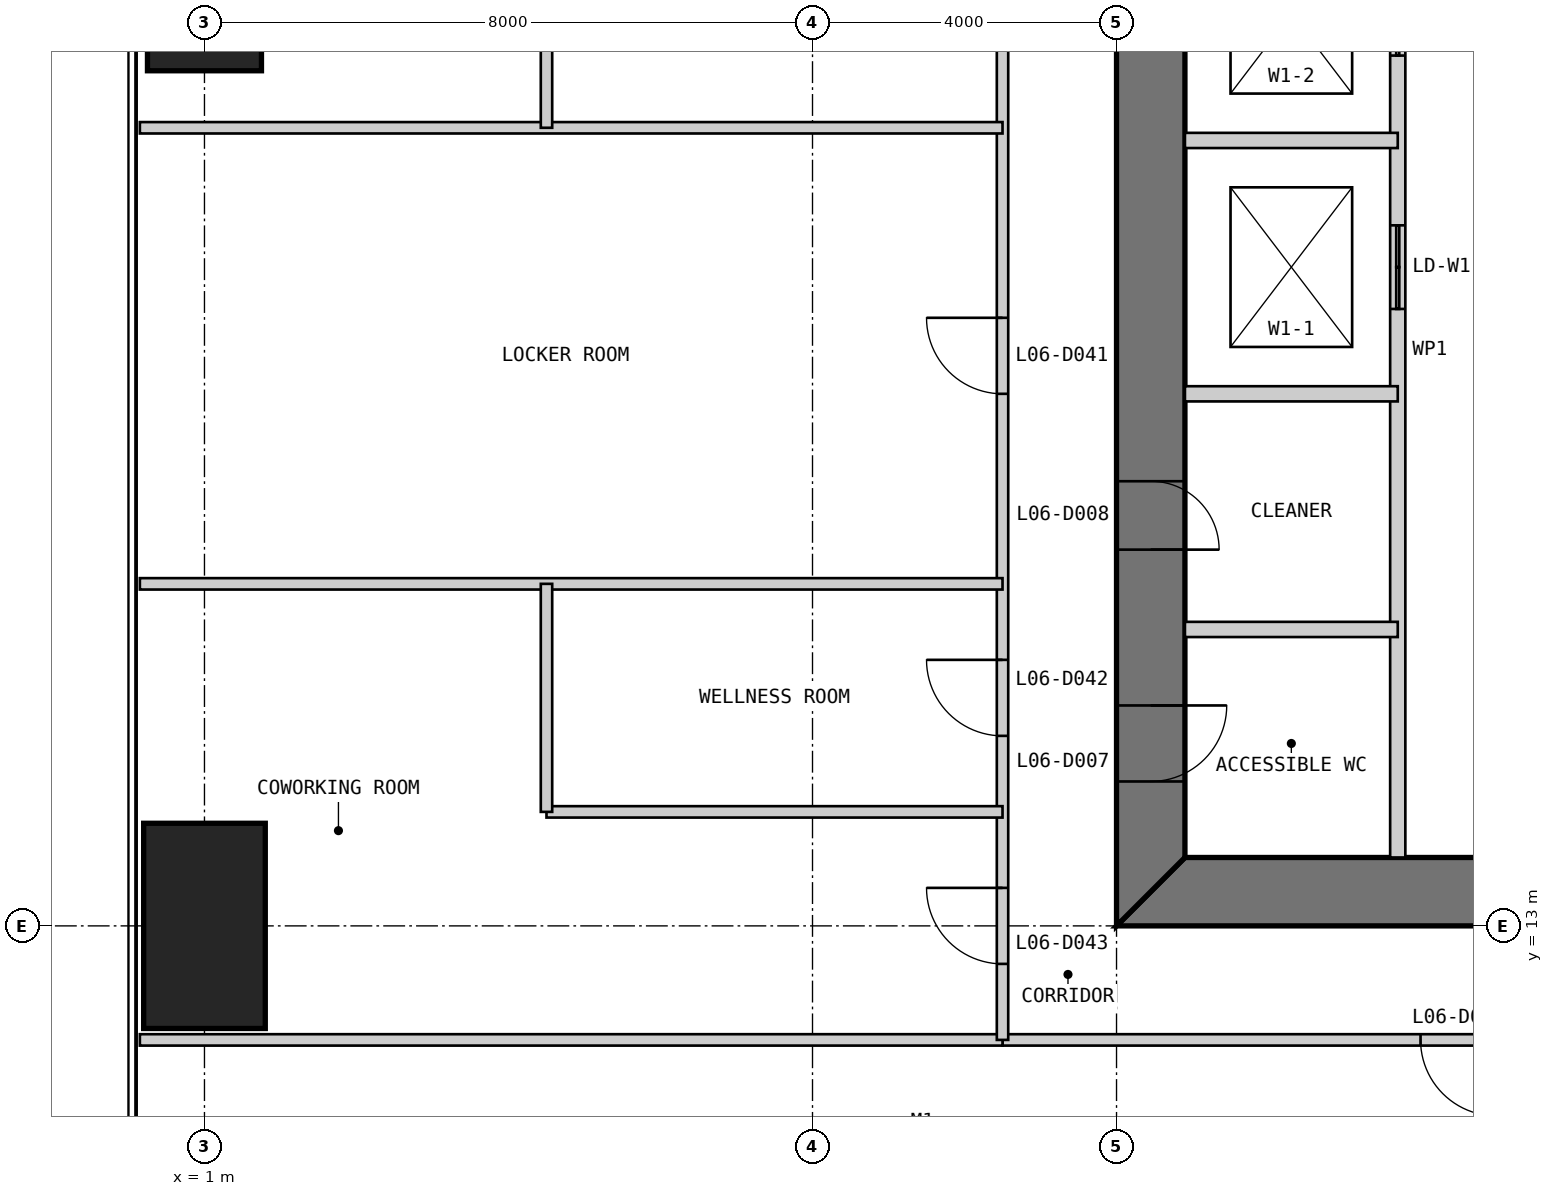
"""IFC4 building model, lengths in metres.
Left out: names, types, materials, properties, quantities, classifications, styles, units other than length and angle.
Written with IfcOpenShell. Run it as: python <this file> out.ifc"""

import sys

from ifc_helpers import new_model, si_unit, direction, frame, frame_2d, origin, origin_2d, place, context, subcontext, project, spatial, polyline, rectangle, outline, extrude, element, fill, save


model = new_model("IFC4")
c1 = context("Model", 3, precision=1e-05, world=origin(), true_north=direction((0.0, 1.0)))
c2 = subcontext(c1, "Body", "Model", "MODEL_VIEW")
j1 = project(units=[si_unit("LENGTHUNIT", "METRE"), si_unit("PLANEANGLEUNIT", "RADIAN")], contexts=[c1])
p1 = place(None, origin())
s1 = spatial("IfcSite", under=j1, at=p1, CompositionType="ELEMENT")
p2 = place(p1, origin())
s2 = spatial("IfcBuilding", under=s1, at=p2, CompositionType="ELEMENT")
p3 = place(p2, frame((0.0, 0.0, 31.0)))
s3 = spatial("IfcBuildingStorey", under=s2, at=p3, CompositionType="ELEMENT", Elevation=31.0)
p4 = place(p3, frame((1.0, 25.0, 0.0), z_axis=(0.0, 0.0, 1.0), x_axis=(1.0, 0.0, 0.0)))
e1 = element("IfcColumn", 1, at=p4, inside=s3, PredefinedType="COLUMN", context=c2, shape_type="SweptSolid", body=[
    extrude(rectangle(XDim=1.5, YDim=1.5, at=origin_2d()), origin(), (0.0, 0.0, 1.0), 4.0),
])
p5 = place(p3, frame((1.0, 13.0, 0.0), z_axis=(0.0, 0.0, 1.0), x_axis=(1.0, 0.0, 0.0)))
e2 = element("IfcColumn", 2, at=p5, inside=s3, PredefinedType="COLUMN", context=c2, shape_type="SweptSolid", body=[
    extrude(rectangle(XDim=1.6, YDim=2.7, at=origin_2d()), origin(), (0.0, 0.0, 1.0), 4.0),
])
p6 = place(p3, frame((13.0, 13.45, 0.0), z_axis=(0.0, 0.0, 1.0), x_axis=(1.0, 0.0, 0.0)))
e3 = element("IfcWall", 3, at=p6, inside=s3, PredefinedType="SHEAR", context=c2, shape_type="SweptSolid", body=[
    extrude(outline(polyline([(0.0, -0.45), (24.0, -0.45), (23.1, 0.45), (0.9, 0.45), (0.0, -0.45)])), origin(), (0.0, 0.0, 1.0), 4.0),
])
p7 = place(p6, frame((4.9, 0.0, 0.0)))
e4 = element("IfcOpeningElement", 4, at=p7, cuts=e3, PredefinedType="OPENING", context=c2, shape_type="SweptSolid", body=[
    extrude(rectangle(XDim=1.0, YDim=2.2, at=frame_2d((0.5, 1.1))), frame((0.0, 0.46, 0.0), z_axis=(0.0, -1.0, 0.0), x_axis=(1.0, 0.0, 0.0)), (0.0, 0.0, 1.0), 0.92),
])
p8 = place(p6, frame((8.9, 0.0, 0.0)))
e5 = element("IfcOpeningElement", 5, at=p8, cuts=e3, PredefinedType="OPENING", context=c2, shape_type="SweptSolid", body=[
    extrude(rectangle(XDim=1.1, YDim=2.2, at=frame_2d((0.55, 1.1))), frame((0.0, 0.46, 0.0), z_axis=(0.0, -1.0, 0.0), x_axis=(1.0, 0.0, 0.0)), (0.0, 0.0, 1.0), 0.92),
])
p9 = place(p6, frame((15.05, 0.0, 0.0)))
e6 = element("IfcOpeningElement", 6, at=p9, cuts=e3, PredefinedType="OPENING", context=c2, shape_type="SweptSolid", body=[
    extrude(rectangle(XDim=0.9, YDim=2.2, at=frame_2d((0.45, 1.1))), frame((0.0, 0.46, 0.0), z_axis=(0.0, -1.0, 0.0), x_axis=(1.0, 0.0, 0.0)), (0.0, 0.0, 1.0), 0.92),
])
p10 = place(p6, frame((17.9, 0.0, 0.0)))
e7 = element("IfcOpeningElement", 7, at=p10, cuts=e3, PredefinedType="OPENING", context=c2, shape_type="SweptSolid", body=[
    extrude(rectangle(XDim=1.0, YDim=2.2, at=frame_2d((0.5, 1.1))), frame((0.0, 0.46, 0.0), z_axis=(0.0, -1.0, 0.0), x_axis=(1.0, 0.0, 0.0)), (0.0, 0.0, 1.0), 0.92),
])
p11 = place(p6, frame((21.4, 0.0, 0.0)))
e8 = element("IfcOpeningElement", 8, at=p11, cuts=e3, PredefinedType="OPENING", context=c2, shape_type="SweptSolid", body=[
    extrude(rectangle(XDim=1.0, YDim=2.2, at=frame_2d((0.5, 1.1))), frame((0.0, 0.46, 0.0), z_axis=(0.0, -1.0, 0.0), x_axis=(1.0, 0.0, 0.0)), (0.0, 0.0, 1.0), 0.92),
])
p12 = place(p3, frame((13.45, 36.1, 0.0), z_axis=(0.0, 0.0, 1.0), x_axis=(0.0, -1.0, 0.0)))
e9 = element("IfcWall", 9, at=p12, inside=s3, PredefinedType="SHEAR", context=c2, shape_type="SweptSolid", body=[
    extrude(outline(polyline([(-0.9, -0.45), (23.1, -0.45), (22.2, 0.45), (0.0, 0.45), (-0.9, -0.45)])), origin(), (0.0, 0.0, 1.0), 4.0),
])
p13 = place(p12, frame((20.2, 0.0, 0.0)))
e10 = element("IfcOpeningElement", 10, at=p13, cuts=e9, PredefinedType="OPENING", context=c2, shape_type="SweptSolid", body=[
    extrude(rectangle(XDim=1.0, YDim=2.2, at=frame_2d((0.5, 1.1))), frame((0.0, 0.46, 0.0), z_axis=(0.0, -1.0, 0.0), x_axis=(1.0, 0.0, 0.0)), (0.0, 0.0, 1.0), 0.92),
])
p14 = place(p12, frame((17.25, 0.0, 0.0)))
e11 = element("IfcOpeningElement", 11, at=p14, cuts=e9, PredefinedType="OPENING", context=c2, shape_type="SweptSolid", body=[
    extrude(rectangle(XDim=0.9, YDim=2.2, at=frame_2d((0.45, 1.1))), frame((0.0, 0.46, 0.0), z_axis=(0.0, -1.0, 0.0), x_axis=(1.0, 0.0, 0.0)), (0.0, 0.0, 1.0), 0.92),
])
p15 = place(p3, frame((16.7, 13.9, 0.0), z_axis=(0.0, 0.0, 1.0), x_axis=(0.0, 1.0, 0.0)))
e12 = element("IfcWall", 12, at=p15, inside=s3, PredefinedType="PARTITIONING", context=c2, shape_type="SweptSolid", body=[
    extrude(rectangle(XDim=16.1, YDim=0.2, at=frame_2d((8.05, 0.0))), origin(), (0.0, 0.0, 1.0), 3.8),
])
p16 = place(p15, frame((7.217, 0.0, 0.0)))
e13 = element("IfcOpeningElement", 13, at=p16, cuts=e12, PredefinedType="OPENING", context=c2, shape_type="SweptSolid", body=[
    extrude(rectangle(XDim=1.1, YDim=2.2, at=frame_2d((0.55, 1.1))), frame((0.0, 0.11, 0.0), z_axis=(0.0, -1.0, 0.0), x_axis=(1.0, 0.0, 0.0)), (0.0, 0.0, 1.0), 0.22),
])
p17 = place(p15, frame((10.55, 0.0, 0.0)))
e14 = element("IfcOpeningElement", 14, at=p17, cuts=e12, PredefinedType="OPENING", context=c2, shape_type="SweptSolid", body=[
    extrude(rectangle(XDim=1.1, YDim=2.2, at=frame_2d((0.55, 1.1))), frame((0.0, 0.11, 0.0), z_axis=(0.0, -1.0, 0.0), x_axis=(1.0, 0.0, 0.0)), (0.0, 0.0, 1.0), 0.22),
])
p18 = place(p15, frame((13.883, 0.0, 0.0)))
e15 = element("IfcOpeningElement", 15, at=p18, cuts=e12, PredefinedType="OPENING", context=c2, shape_type="SweptSolid", body=[
    extrude(rectangle(XDim=1.1, YDim=2.2, at=frame_2d((0.55, 1.1))), frame((0.0, 0.11, 0.0), z_axis=(0.0, -1.0, 0.0), x_axis=(1.0, 0.0, 0.0)), (0.0, 0.0, 1.0), 0.22),
])
for number, where, z_axis, x_axis in (
    (16, (13.9, 16.9, 0.0), (0.0, 0.0, 1.0), (1.0, 0.0, 0.0)),
    (17, (13.9, 20.0, 0.0), (0.0, 0.0, 1.0), (1.0, 0.0, 0.0)),
    (18, (13.9, 23.333, 0.0), (0.0, 0.0, 1.0), (1.0, 0.0, 0.0)),
):
    element("IfcWall", number, at=place(p3, frame(where, z_axis=z_axis, x_axis=x_axis)), inside=s3, PredefinedType="PARTITIONING", context=c2, shape_type="SweptSolid", body=[
        extrude(rectangle(XDim=2.8, YDim=0.2, at=frame_2d((1.4, 0.0))), origin(), (0.0, 0.0, 1.0), 3.8),
    ])
p19 = place(p3, frame((11.5, 11.5, 0.0), z_axis=(0.0, 0.0, 1.0), x_axis=(1.0, 0.0, 0.0)))
e19 = element("IfcWall", 19, at=p19, inside=s3, PredefinedType="PARTITIONING", context=c2, shape_type="SweptSolid", body=[
    extrude(rectangle(XDim=27.0, YDim=0.15, at=frame_2d((13.5, 0.0))), origin(), (0.0, 0.0, 1.0), 3.85),
])
p20 = place(p19, frame((5.5, 0.0, 0.0)))
e20 = element("IfcOpeningElement", 20, at=p20, cuts=e19, PredefinedType="OPENING", context=c2, shape_type="SweptSolid", body=[
    extrude(rectangle(XDim=1.0, YDim=2.2, at=frame_2d((0.5, 1.1))), frame((0.0, 0.085, 0.0), z_axis=(0.0, -1.0, 0.0), x_axis=(1.0, 0.0, 0.0)), (0.0, 0.0, 1.0), 0.17),
])
p21 = place(p19, frame((17.5, 0.0, 0.0)))
e21 = element("IfcOpeningElement", 21, at=p21, cuts=e19, PredefinedType="OPENING", context=c2, shape_type="SweptSolid", body=[
    extrude(rectangle(XDim=1.0, YDim=2.2, at=frame_2d((0.5, 1.1))), frame((0.0, 0.085, 0.0), z_axis=(0.0, -1.0, 0.0), x_axis=(1.0, 0.0, 0.0)), (0.0, 0.0, 1.0), 0.17),
])
p22 = place(p19, frame((23.5, 0.0, 0.0)))
e22 = element("IfcOpeningElement", 22, at=p22, cuts=e19, PredefinedType="OPENING", context=c2, shape_type="SweptSolid", body=[
    extrude(rectangle(XDim=1.0, YDim=2.2, at=frame_2d((0.5, 1.1))), frame((0.0, 0.085, 0.0), z_axis=(0.0, -1.0, 0.0), x_axis=(1.0, 0.0, 0.0)), (0.0, 0.0, 1.0), 0.17),
])
p23 = place(p3, frame((0.15, 11.5, 0.0), z_axis=(0.0, 0.0, 1.0), x_axis=(1.0, 0.0, 0.0)))
e23 = element("IfcWall", 23, at=p23, inside=s3, PredefinedType="PARTITIONING", context=c2, shape_type="SweptSolid", body=[
    extrude(rectangle(XDim=11.35, YDim=0.15, at=frame_2d((5.675, 0.0))), origin(), (0.0, 0.0, 1.0), 3.85),
])
p24 = place(p3, frame((11.5, 38.5, 0.0), z_axis=(0.0, 0.0, 1.0), x_axis=(0.0, -1.0, 0.0)))
e24 = element("IfcWall", 24, at=p24, inside=s3, PredefinedType="PARTITIONING", context=c2, shape_type="SweptSolid", body=[
    extrude(rectangle(XDim=27.0, YDim=0.15, at=frame_2d((13.5, 0.0))), origin(), (0.0, 0.0, 1.0), 3.85),
])
p25 = place(p24, frame((2.5, 0.0, 0.0)))
e25 = element("IfcOpeningElement", 25, at=p25, cuts=e24, PredefinedType="OPENING", context=c2, shape_type="SweptSolid", body=[
    extrude(rectangle(XDim=1.0, YDim=2.2, at=frame_2d((0.5, 1.1))), frame((0.0, 0.085, 0.0), z_axis=(0.0, -1.0, 0.0), x_axis=(1.0, 0.0, 0.0)), (0.0, 0.0, 1.0), 0.17),
])
p26 = place(p24, frame((11.5, 0.0, 0.0)))
e26 = element("IfcOpeningElement", 26, at=p26, cuts=e24, PredefinedType="OPENING", context=c2, shape_type="SweptSolid", body=[
    extrude(rectangle(XDim=1.0, YDim=2.2, at=frame_2d((0.5, 1.1))), frame((0.0, 0.085, 0.0), z_axis=(0.0, -1.0, 0.0), x_axis=(1.0, 0.0, 0.0)), (0.0, 0.0, 1.0), 0.17),
])
p27 = place(p24, frame((17.5, 0.0, 0.0)))
e27 = element("IfcOpeningElement", 27, at=p27, cuts=e24, PredefinedType="OPENING", context=c2, shape_type="SweptSolid", body=[
    extrude(rectangle(XDim=1.0, YDim=2.2, at=frame_2d((0.5, 1.1))), frame((0.0, 0.085, 0.0), z_axis=(0.0, -1.0, 0.0), x_axis=(1.0, 0.0, 0.0)), (0.0, 0.0, 1.0), 0.17),
])
p28 = place(p24, frame((22.0, 0.0, 0.0)))
e28 = element("IfcOpeningElement", 28, at=p28, cuts=e24, PredefinedType="OPENING", context=c2, shape_type="SweptSolid", body=[
    extrude(rectangle(XDim=1.0, YDim=2.2, at=frame_2d((0.5, 1.1))), frame((0.0, 0.085, 0.0), z_axis=(0.0, -1.0, 0.0), x_axis=(1.0, 0.0, 0.0)), (0.0, 0.0, 1.0), 0.17),
])
p29 = place(p24, frame((25.0, 0.0, 0.0)))
e29 = element("IfcOpeningElement", 29, at=p29, cuts=e24, PredefinedType="OPENING", context=c2, shape_type="SweptSolid", body=[
    extrude(rectangle(XDim=1.0, YDim=2.2, at=frame_2d((0.5, 1.1))), frame((0.0, 0.085, 0.0), z_axis=(0.0, -1.0, 0.0), x_axis=(1.0, 0.0, 0.0)), (0.0, 0.0, 1.0), 0.17),
])
for number, where, z_axis, x_axis in (
    (30, (0.15, 23.5, 0.0), (0.0, 0.0, 1.0), (1.0, 0.0, 0.0)),
    (31, (0.15, 17.5, 0.0), (0.0, 0.0, 1.0), (1.0, 0.0, 0.0)),
):
    element("IfcWall", number, at=place(p3, frame(where, z_axis=z_axis, x_axis=x_axis)), inside=s3, PredefinedType="PARTITIONING", context=c2, shape_type="SweptSolid", body=[
        extrude(rectangle(XDim=11.35, YDim=0.15, at=frame_2d((5.675, 0.0))), origin(), (0.0, 0.0, 1.0), 3.85),
    ])
for number, where, z_axis, x_axis in (
    (32, (5.5, 14.5, 0.0), (0.0, 0.0, 1.0), (1.0, 0.0, 0.0)),
    (33, (5.5, 29.5, 0.0), (0.0, 0.0, 1.0), (0.0, -1.0, 0.0)),
):
    element("IfcWall", number, at=place(p3, frame(where, z_axis=z_axis, x_axis=x_axis)), inside=s3, PredefinedType="PARTITIONING", context=c2, shape_type="SweptSolid", body=[
        extrude(rectangle(XDim=6.0, YDim=0.15, at=frame_2d((3.0, 0.0))), origin(), (0.0, 0.0, 1.0), 3.85),
    ])
p30 = place(p3, frame((5.5, 17.5, 0.0), z_axis=(0.0, 0.0, 1.0), x_axis=(0.0, -1.0, 0.0)))
e34 = element("IfcWall", 34, at=p30, inside=s3, PredefinedType="PARTITIONING", context=c2, shape_type="SweptSolid", body=[
    extrude(rectangle(XDim=3.0, YDim=0.15, at=frame_2d((1.5, 0.0))), origin(), (0.0, 0.0, 1.0), 3.85),
])
p31 = place(p13, origin())
e35 = element("IfcDoor", 35, at=p31, inside=s3, OperationType="SINGLE_SWING_LEFT", PredefinedType="DOOR", context=c2, shape_type="SweptSolid", body=[
    extrude(rectangle(XDim=1.0, YDim=2.2, at=frame_2d((0.5, 1.1))), frame((0.0, 0.025, 0.0), z_axis=(0.0, -1.0, 0.0), x_axis=(1.0, 0.0, 0.0)), (0.0, 0.0, 1.0), 0.05),
    extrude(outline(polyline([(0.0, 0.0), (0.04, 0.0), (0.04, 2.16), (0.96, 2.16), (0.96, 0.0), (1.0, 0.0), (1.0, 2.2), (0.0, 2.2), (0.0, 0.0)])), frame((0.0, 0.3, 0.0), z_axis=(0.0, -1.0, 0.0), x_axis=(1.0, 0.0, 0.0)), (0.0, 0.0, 1.0), 0.6),
])
fill(e10, e35)
p32 = place(p14, origin())
e36 = element("IfcDoor", 36, at=p32, inside=s3, OperationType="SINGLE_SWING_RIGHT", PredefinedType="DOOR", context=c2, shape_type="SweptSolid", body=[
    extrude(rectangle(XDim=0.9, YDim=2.2, at=frame_2d((0.45, 1.1))), frame((0.0, 0.025, 0.0), z_axis=(0.0, -1.0, 0.0), x_axis=(1.0, 0.0, 0.0)), (0.0, 0.0, 1.0), 0.05),
    extrude(outline(polyline([(0.0, 0.0), (0.04, 0.0), (0.04, 2.16), (0.86, 2.16), (0.86, 0.0), (0.9, 0.0), (0.9, 2.2), (0.0, 2.2), (0.0, 0.0)])), frame((0.0, 0.3, 0.0), z_axis=(0.0, -1.0, 0.0), x_axis=(1.0, 0.0, 0.0)), (0.0, 0.0, 1.0), 0.6),
])
fill(e11, e36)
p33 = place(p20, frame((1.0, 0.0, 0.0), z_axis=(0.0, 0.0, 1.0), x_axis=(-1.0, 0.0, 0.0)))
e37 = element("IfcDoor", 37, at=p33, inside=s3, OperationType="SINGLE_SWING_LEFT", PredefinedType="DOOR", context=c2, shape_type="SweptSolid", body=[
    extrude(rectangle(XDim=1.0, YDim=2.2, at=frame_2d((0.5, 1.1))), frame((0.0, 0.025, 0.0), z_axis=(0.0, -1.0, 0.0), x_axis=(1.0, 0.0, 0.0)), (0.0, 0.0, 1.0), 0.05),
])
fill(e20, e37)
p34 = place(p27, frame((1.0, 0.0, 0.0), z_axis=(0.0, 0.0, 1.0), x_axis=(-1.0, 0.0, 0.0)))
e38 = element("IfcDoor", 38, at=p34, inside=s3, OperationType="SINGLE_SWING_RIGHT", PredefinedType="DOOR", context=c2, shape_type="SweptSolid", body=[
    extrude(rectangle(XDim=1.0, YDim=2.2, at=frame_2d((0.5, 1.1))), frame((0.0, 0.025, 0.0), z_axis=(0.0, -1.0, 0.0), x_axis=(1.0, 0.0, 0.0)), (0.0, 0.0, 1.0), 0.05),
])
fill(e27, e38)
p35 = place(p28, frame((1.0, 0.0, 0.0), z_axis=(0.0, 0.0, 1.0), x_axis=(-1.0, 0.0, 0.0)))
e39 = element("IfcDoor", 39, at=p35, inside=s3, OperationType="SINGLE_SWING_RIGHT", PredefinedType="DOOR", context=c2, shape_type="SweptSolid", body=[
    extrude(rectangle(XDim=1.0, YDim=2.2, at=frame_2d((0.5, 1.1))), frame((0.0, 0.025, 0.0), z_axis=(0.0, -1.0, 0.0), x_axis=(1.0, 0.0, 0.0)), (0.0, 0.0, 1.0), 0.05),
])
fill(e28, e39)
p36 = place(p29, frame((1.0, 0.0, 0.0), z_axis=(0.0, 0.0, 1.0), x_axis=(-1.0, 0.0, 0.0)))
e40 = element("IfcDoor", 40, at=p36, inside=s3, OperationType="SINGLE_SWING_RIGHT", PredefinedType="DOOR", context=c2, shape_type="SweptSolid", body=[
    extrude(rectangle(XDim=1.0, YDim=2.2, at=frame_2d((0.5, 1.1))), frame((0.0, 0.025, 0.0), z_axis=(0.0, -1.0, 0.0), x_axis=(1.0, 0.0, 0.0)), (0.0, 0.0, 1.0), 0.05),
])
fill(e29, e40)
p37 = place(p16, origin())
e41 = element("IfcDoor", 41, at=p37, inside=s3, OperationType="DOUBLE_DOOR_SLIDING", PredefinedType="DOOR", context=c2, shape_type="SweptSolid", body=[
    extrude(rectangle(XDim=1.1, YDim=2.2, at=frame_2d((0.55, 1.1))), frame((0.0, 0.025, 0.0), z_axis=(0.0, -1.0, 0.0), x_axis=(1.0, 0.0, 0.0)), (0.0, 0.0, 1.0), 0.05),
])
fill(e13, e41)
p38 = place(p17, origin())
e42 = element("IfcDoor", 42, at=p38, inside=s3, OperationType="DOUBLE_DOOR_SLIDING", PredefinedType="DOOR", context=c2, shape_type="SweptSolid", body=[
    extrude(rectangle(XDim=1.1, YDim=2.2, at=frame_2d((0.55, 1.1))), frame((0.0, 0.025, 0.0), z_axis=(0.0, -1.0, 0.0), x_axis=(1.0, 0.0, 0.0)), (0.0, 0.0, 1.0), 0.05),
])
fill(e14, e42)
save(model, sys.argv[1])
